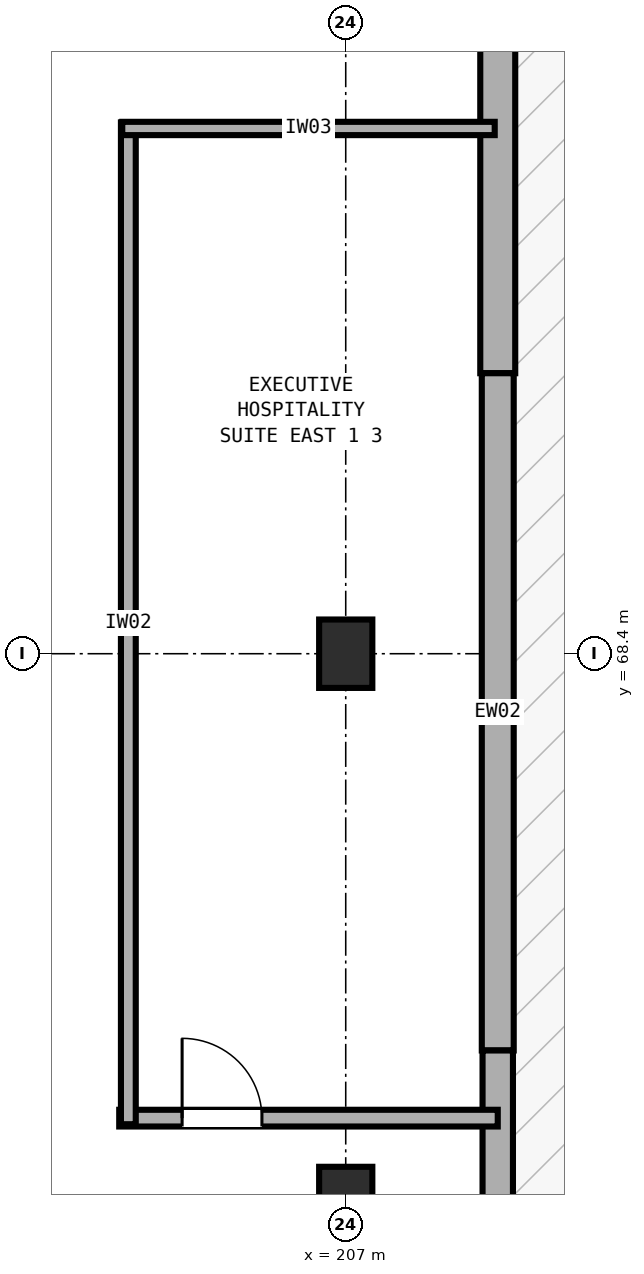
"""IFC4 building model, lengths in metres.
Left out: names, types, materials, properties, quantities, classifications, styles, units other than length and angle.
Written with IfcOpenShell. Run it as: python <this file> out.ifc"""

import sys

from ifc_helpers import new_model, si_unit, direction, frame, frame_2d, origin, origin_2d, place, context, subcontext, project, spatial, rectangle, extrude, element, fill, save


model = new_model("IFC4")
c1 = context("Model", 3, precision=1e-05, world=origin(), true_north=direction((0.0, 1.0)))
c2 = subcontext(c1, "Body", "Model", "MODEL_VIEW")
j1 = project(units=[si_unit("LENGTHUNIT", "METRE"), si_unit("PLANEANGLEUNIT", "RADIAN")], contexts=[c1])
p1 = place(None, origin())
s1 = spatial("IfcSite", under=j1, at=p1, CompositionType="ELEMENT")
p2 = place(p1, origin())
s2 = spatial("IfcBuilding", under=s1, at=p2, CompositionType="ELEMENT")
p3 = place(p2, frame((0.0, 0.0, 14.4)))
s3 = spatial("IfcBuildingStorey", under=s2, at=p3, CompositionType="ELEMENT", Elevation=14.4)
for number, where, z_axis, x_axis in (
    (1, (207.0, 61.2, 0.0), (0.0, 0.0, 1.0), (1.0, 0.0, 0.0)),
    (2, (207.0, 68.4, 0.0), (0.0, 0.0, 1.0), (1.0, 0.0, 0.0)),
):
    element("IfcColumn", number, at=place(p3, frame(where, z_axis=z_axis, x_axis=x_axis)), inside=s3, PredefinedType="COLUMN", context=c2, shape_type="SweptSolid", body=[
        extrude(rectangle(XDim=0.7, YDim=0.9, at=origin_2d()), origin(), (0.0, 0.0, 1.0), 4.8),
    ])
p4 = place(p3, frame((209.0, 81.0, 0.0), z_axis=(0.0, 0.0, 1.0), x_axis=(0.0, -1.0, 0.0)))
e3 = element("IfcWall", 3, at=p4, inside=s3, PredefinedType="SOLIDWALL", context=c2, shape_type="SweptSolid", body=[
    extrude(rectangle(XDim=8.91, YDim=0.46, at=frame_2d((4.455, 0.0))), origin(), (0.0, 0.0, 1.0), 3.58),
])
p5 = place(p3, frame((209.0, 72.09, 0.0), z_axis=(0.0, 0.0, 1.0), x_axis=(0.0, -1.0, 0.0)))
e4 = element("IfcWall", 4, at=p5, inside=s3, PredefinedType="SOLIDWALL", context=c2, shape_type="SweptSolid", body=[
    extrude(rectangle(XDim=8.91, YDim=0.42, at=frame_2d((4.455, 0.0))), origin(), (0.0, 0.0, 1.0), 3.58),
])
p6 = place(p3, frame((209.0, 63.18, 0.0), z_axis=(0.0, 0.0, 1.0), x_axis=(0.0, -1.0, 0.0)))
e5 = element("IfcWall", 5, at=p6, inside=s3, PredefinedType="SOLIDWALL", context=c2, shape_type="SweptSolid", body=[
    extrude(rectangle(XDim=8.91, YDim=0.4, at=frame_2d((4.455, 0.0))), origin(), (0.0, 0.0, 1.0), 3.58),
])
p7 = place(p3, frame((204.02, 62.29, 0.0), z_axis=(0.0, 0.0, 1.0), x_axis=(1.0, 0.0, 0.0)))
e6 = element("IfcWall", 6, at=p7, inside=s3, PredefinedType="PARTITIONING", context=c2, shape_type="SweptSolid", body=[
    extrude(rectangle(XDim=4.98, YDim=0.22, at=frame_2d((2.49, 0.0))), origin(), (0.0, 0.0, 1.0), 3.56),
])
p8 = place(p7, frame((0.827, 0.0, 0.0)))
e7 = element("IfcOpeningElement", 7, at=p8, cuts=e6, PredefinedType="OPENING", context=c2, shape_type="SweptSolid", body=[
    extrude(rectangle(XDim=1.05, YDim=2.1, at=frame_2d((0.525, 1.05))), frame((0.0, 0.12, 0.0), z_axis=(0.0, -1.0, 0.0), x_axis=(1.0, 0.0, 0.0)), (0.0, 0.0, 1.0), 0.24),
])
p9 = place(p3, frame((204.14, 62.21, 0.0), z_axis=(0.0, 0.0, 1.0), x_axis=(0.0, 1.0, 0.0)))
e8 = element("IfcWall", 8, at=p9, inside=s3, PredefinedType="PARTITIONING", context=c2, shape_type="SweptSolid", body=[
    extrude(rectangle(XDim=13.18, YDim=0.195, at=frame_2d((6.59, 0.0))), origin(), (0.0, 0.0, 1.0), 3.56),
])
p10 = place(p3, frame((204.06, 75.31, 0.0), z_axis=(0.0, 0.0, 1.0), x_axis=(1.0, 0.0, 0.0)))
e9 = element("IfcWall", 9, at=p10, inside=s3, PredefinedType="PARTITIONING", context=c2, shape_type="SweptSolid", body=[
    extrude(rectangle(XDim=4.9, YDim=0.175, at=frame_2d((2.45, 0.0))), origin(), (0.0, 0.0, 1.0), 3.56),
])
p11 = place(p8, origin())
e10 = element("IfcDoor", 10, at=p11, inside=s3, OperationType="SINGLE_SWING_LEFT", PredefinedType="DOOR", context=c2, shape_type="SweptSolid", body=[
    extrude(rectangle(XDim=1.05, YDim=2.1, at=frame_2d((0.525, 1.05))), frame((0.0, 0.025, 0.0), z_axis=(0.0, -1.0, 0.0), x_axis=(1.0, 0.0, 0.0)), (0.0, 0.0, 1.0), 0.05),
])
fill(e7, e10)
save(model, sys.argv[1])
